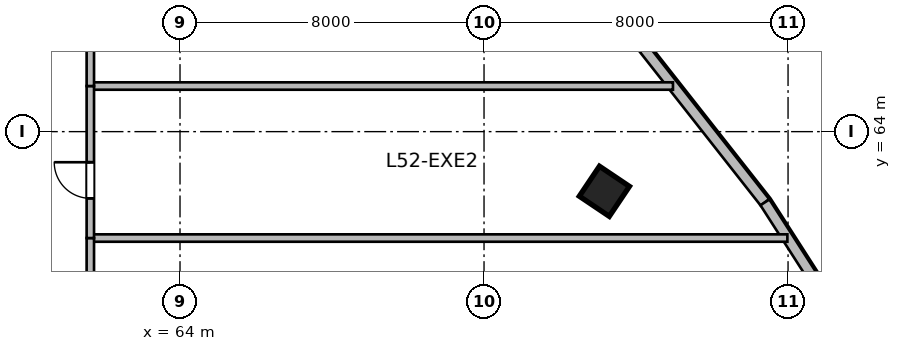
"""IFC4 building model, lengths in metres.
Left out: names, types, materials, properties, quantities, classifications, styles, units other than length and angle.
Written with IfcOpenShell. Run it as: python <this file> out.ifc"""

import sys

from ifc_helpers import new_model, si_unit, direction, frame, frame_2d, origin, origin_2d, place, context, subcontext, project, spatial, rectangle, extrude, source, transform, mapped, element, fill, save


model = new_model("IFC4")
c1 = context("Model", 3, precision=1e-05, world=origin(), true_north=direction((0.0, 1.0)))
c2 = subcontext(c1, "Body", "Model", "MODEL_VIEW")
j1 = project(units=[si_unit("LENGTHUNIT", "METRE"), si_unit("PLANEANGLEUNIT", "RADIAN")], contexts=[c1])
p1 = place(None, origin())
s1 = spatial("IfcSite", under=j1, at=p1, CompositionType="ELEMENT")
p2 = place(p1, origin())
s2 = spatial("IfcBuilding", under=s1, at=p2, CompositionType="ELEMENT")
p3 = place(p2, frame((0.0, 0.0, 215.7)))
s3 = spatial("IfcBuildingStorey", under=s2, at=p3, CompositionType="ELEMENT", Elevation=215.7)
m1 = source(origin(), c2, "Body", "SweptSolid", [
    extrude(rectangle(XDim=0.95, YDim=0.95, at=origin_2d()), origin(), (0.0, 0.0, 1.0), 3.9),
])
p4 = place(p3, frame((75.167, 62.43, 0.0), z_axis=(0.0, 0.0, 1.0), x_axis=(0.55774510898, 0.830012285095, 0.0)))
e1 = element("IfcColumn", 1, at=p4, inside=s3, PredefinedType="COLUMN", context=c2, shape_type="MappedRepresentation", body=[
    mapped(m1, transform((0.0, 0.0, 0.0), scale=1.0)),
])
m2 = source(origin(), c2, "Body", "SweptSolid", [
    extrude(rectangle(XDim=5.153, YDim=0.28, at=frame_2d((2.577, 0.0))), origin(), (0.0, 0.0, 1.0), 3.64),
])
p5 = place(p3, frame((76.205, 66.19, 0.0), z_axis=(0.0, 0.0, 1.0), x_axis=(0.618179283891, -0.786037132054, 0.0)))
e2 = element("IfcWall", 2, at=p5, inside=s3, PredefinedType="SOLIDWALL", context=c2, shape_type="MappedRepresentation", body=[
    mapped(m2, transform((0.0, 0.0, 0.0), scale=1.0)),
])
m3 = source(origin(), c2, "Body", "SweptSolid", [
    extrude(rectangle(XDim=5.303, YDim=0.28, at=frame_2d((2.651, 0.0))), origin(), (0.0, 0.0, 1.0), 3.64),
])
p6 = place(p3, frame((79.391, 62.14, 0.0), z_axis=(0.0, 0.0, 1.0), x_axis=(0.540178067041, -0.84155074469, 0.0)))
e3 = element("IfcWall", 3, at=p6, inside=s3, PredefinedType="SOLIDWALL", context=c2, shape_type="MappedRepresentation", body=[
    mapped(m3, transform((0.0, 0.0, 0.0), scale=1.0)),
])
m4 = source(origin(), c2, "Body", "SweptSolid", [
    extrude(rectangle(XDim=18.342, YDim=0.195, at=frame_2d((9.171, 0.0))), origin(), (0.0, 0.0, 1.0), 3.64),
])
p7 = place(p3, frame((61.64, 61.2, 0.0), z_axis=(0.0, 0.0, 1.0), x_axis=(1.0, 0.0, 0.0)))
e4 = element("IfcWall", 4, at=p7, inside=s3, PredefinedType="PARTITIONING", context=c2, shape_type="MappedRepresentation", body=[
    mapped(m4, transform((0.0, 0.0, 0.0), scale=1.0)),
])
m5 = source(origin(), c2, "Body", "SweptSolid", [
    extrude(rectangle(XDim=3.24, YDim=0.195, at=frame_2d((1.62, 0.0))), origin(), (0.0, 0.0, 1.0), 3.64),
])
p8 = place(p3, frame((61.64, 57.96, 0.0), z_axis=(0.0, 0.0, 1.0), x_axis=(0.0, 1.0, 0.0)))
e5 = element("IfcWall", 5, at=p8, inside=s3, PredefinedType="PARTITIONING", context=c2, shape_type="MappedRepresentation", body=[
    mapped(m5, transform((0.0, 0.0, 0.0), scale=1.0)),
])
m6 = source(origin(), c2, "Body", "SweptSolid", [
    extrude(rectangle(XDim=15.332, YDim=0.195, at=frame_2d((7.666, 0.0))), origin(), (0.0, 0.0, 1.0), 3.64),
])
p9 = place(p3, frame((61.64, 65.2, 0.0), z_axis=(0.0, 0.0, 1.0), x_axis=(1.0, 0.0, 0.0)))
e6 = element("IfcWall", 6, at=p9, inside=s3, PredefinedType="PARTITIONING", context=c2, shape_type="MappedRepresentation", body=[
    mapped(m6, transform((0.0, 0.0, 0.0), scale=1.0)),
])
m7 = source(origin(), c2, "Body", "SweptSolid", [
    extrude(rectangle(XDim=4.0, YDim=0.195, at=frame_2d((2.0, 0.0))), origin(), (0.0, 0.0, 1.0), 3.64),
])
p10 = place(p3, frame((61.64, 61.2, 0.0), z_axis=(0.0, 0.0, 1.0), x_axis=(0.0, 1.0, 0.0)))
e7 = element("IfcWall", 7, at=p10, inside=s3, PredefinedType="PARTITIONING", context=c2, shape_type="MappedRepresentation", body=[
    mapped(m7, transform((0.0, 0.0, 0.0), scale=1.0)),
])
p11 = place(p10, frame((1.045, 0.0, 0.0)))
e8 = element("IfcOpeningElement", 8, at=p11, cuts=e7, PredefinedType="OPENING", context=c2, shape_type="SweptSolid", body=[
    extrude(rectangle(XDim=0.95, YDim=2.1, at=frame_2d((0.475, 1.05))), frame((0.0, 0.107, 0.0), z_axis=(0.0, -1.0, 0.0), x_axis=(1.0, 0.0, 0.0)), (0.0, 0.0, 1.0), 0.215),
])
m8 = source(origin(), c2, "Body", "SweptSolid", [
    extrude(rectangle(XDim=11.969, YDim=0.195, at=frame_2d((5.984, 0.0))), origin(), (0.0, 0.0, 1.0), 3.64),
])
p12 = place(p3, frame((61.64, 65.2, 0.0), z_axis=(0.0, 0.0, 1.0), x_axis=(0.0, 1.0, 0.0)))
e9 = element("IfcWall", 9, at=p12, inside=s3, PredefinedType="PARTITIONING", context=c2, shape_type="MappedRepresentation", body=[
    mapped(m8, transform((0.0, 0.0, 0.0), scale=1.0)),
])
p13 = place(p12, frame((5.51, 0.0, 0.0)))
e10 = element("IfcOpeningElement", 10, at=p13, cuts=e9, PredefinedType="OPENING", context=c2, shape_type="SweptSolid", body=[
    extrude(rectangle(XDim=0.95, YDim=2.1, at=frame_2d((0.475, 1.05))), frame((0.0, 0.107, 0.0), z_axis=(0.0, -1.0, 0.0), x_axis=(1.0, 0.0, 0.0)), (0.0, 0.0, 1.0), 0.215),
])
m9 = source(origin(), c2, "Body", "SweptSolid", [
    extrude(rectangle(XDim=0.95, YDim=2.1, at=frame_2d((0.475, 1.05))), frame((0.0, 0.025, 0.0), z_axis=(0.0, -1.0, 0.0), x_axis=(1.0, 0.0, 0.0)), (0.0, 0.0, 1.0), 0.05),
])
p14 = place(p11, origin())
e11 = element("IfcDoor", 11, at=p14, inside=s3, OperationType="SINGLE_SWING_RIGHT", PredefinedType="DOOR", context=c2, shape_type="MappedRepresentation", body=[
    mapped(m9, transform((0.0, 0.0, 0.0), scale=1.0)),
])
fill(e8, e11)
save(model, sys.argv[1])
